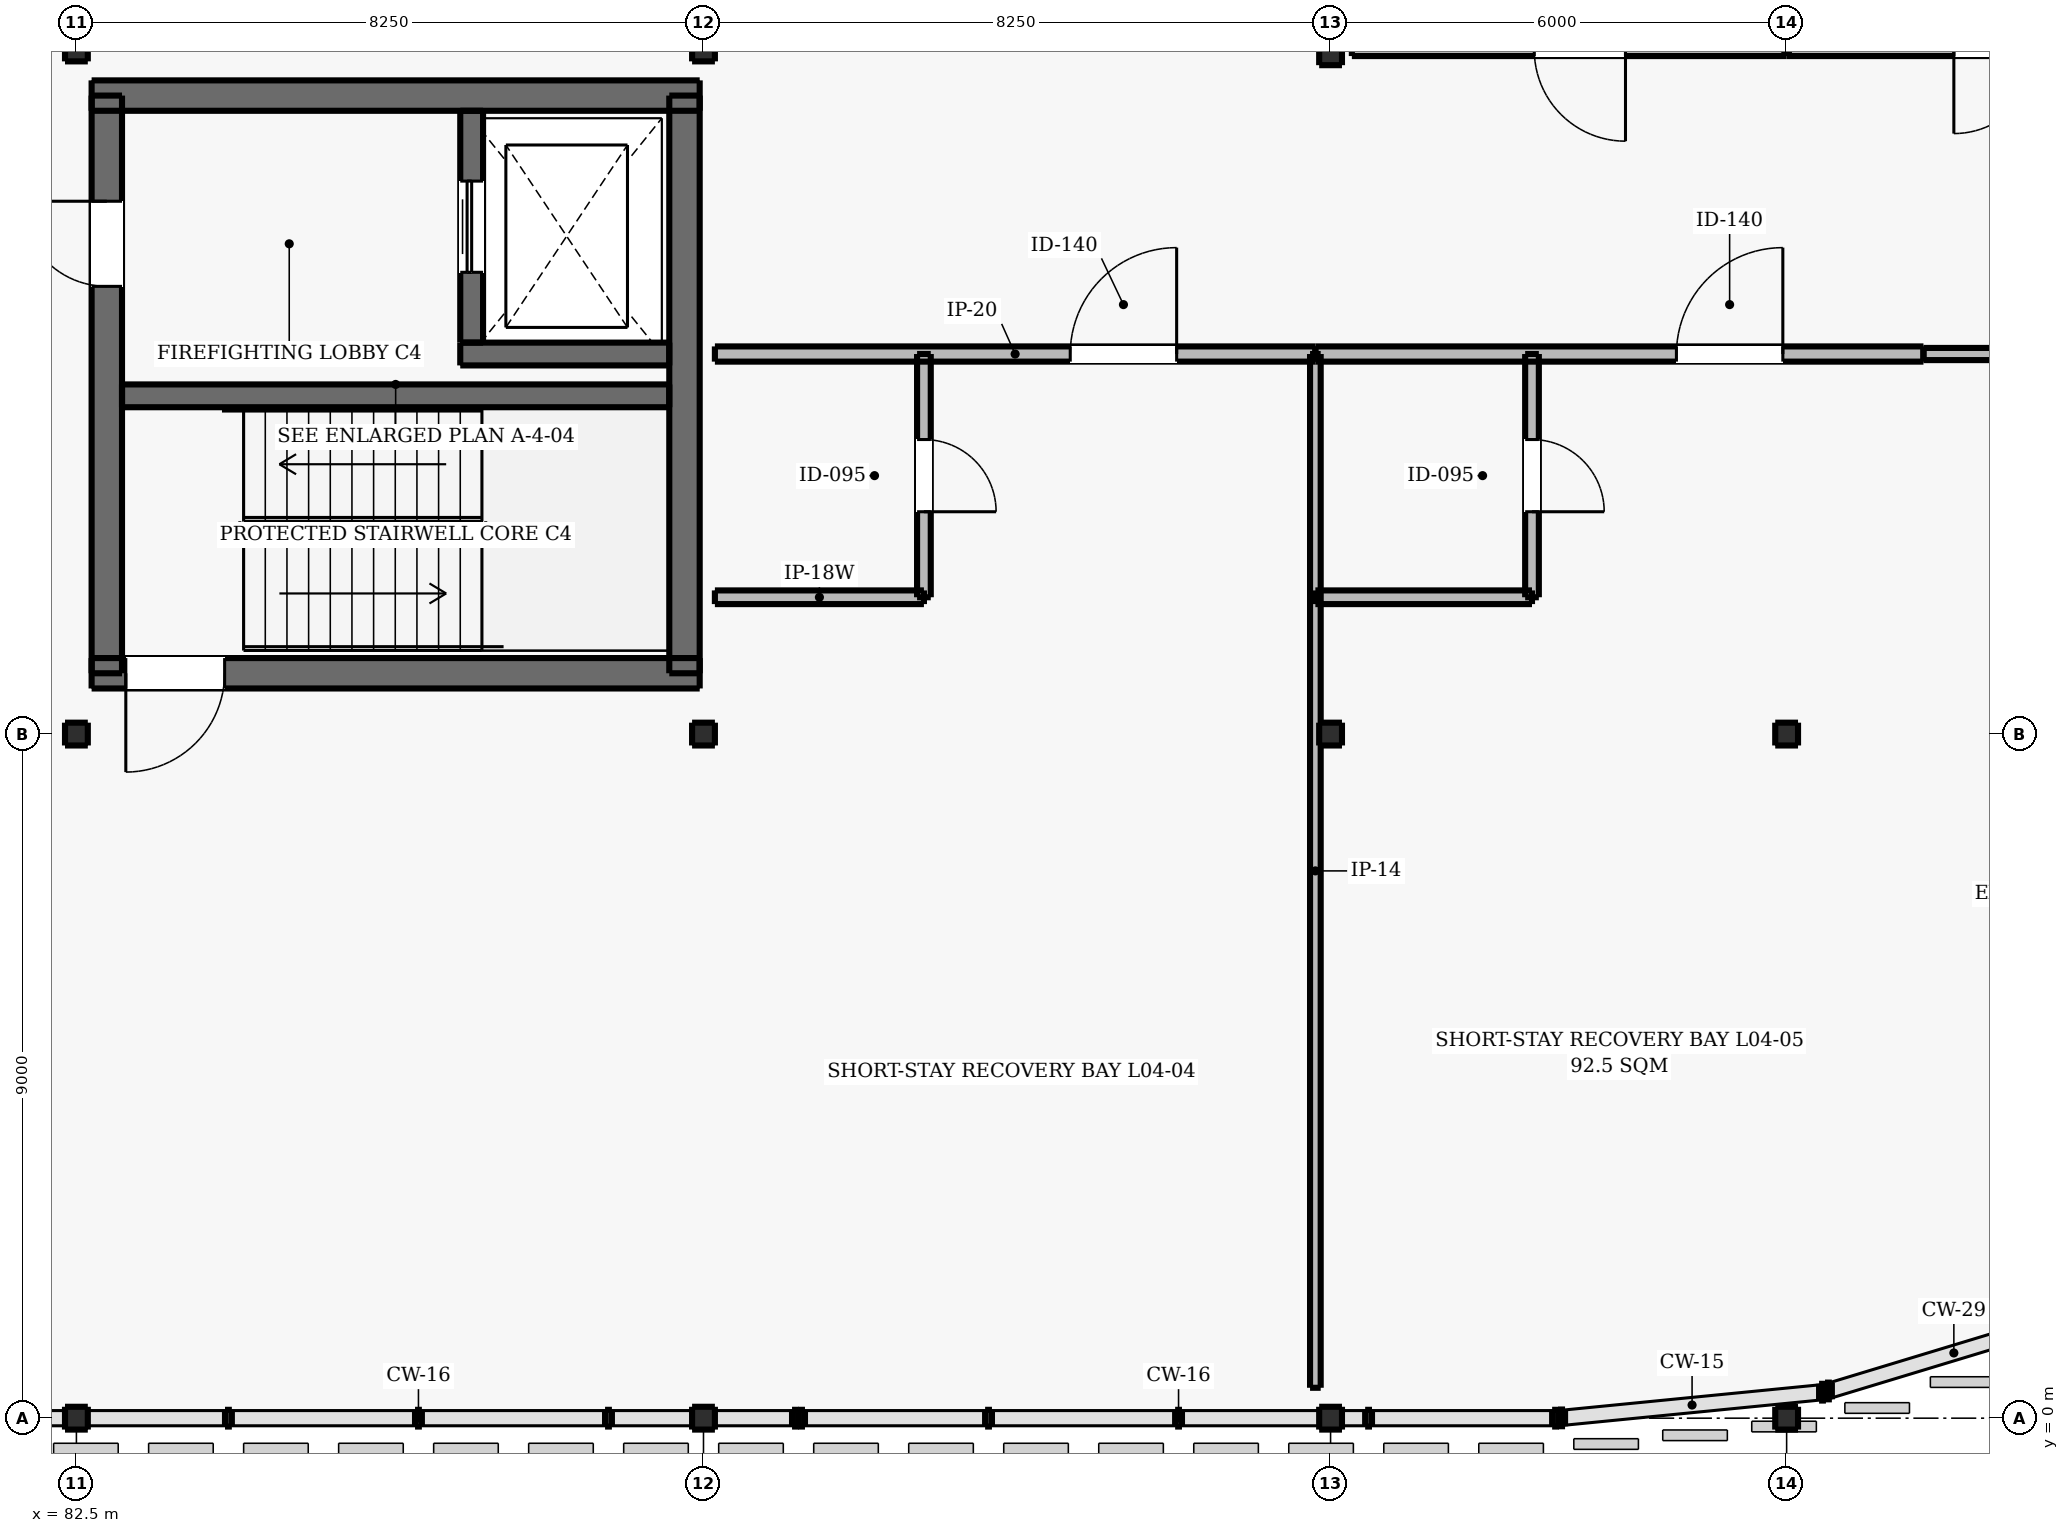
"""IFC4 building model, lengths in metres.
Left out: names, types, materials, properties, quantities, classifications, styles, units other than length and angle.
Written with IfcOpenShell. Run it as: python <this file> out.ifc"""

import sys

from ifc_helpers import new_model, si_unit, direction, frame, frame_2d, origin, origin_2d, place, context, subcontext, project, spatial, rectangle, i_section, extrude, element, fill, save


model = new_model("IFC4")
c1 = context("Model", 3, precision=1e-05, world=origin(), true_north=direction((0.0, 1.0)))
c2 = subcontext(c1, "Body", "Model", "MODEL_VIEW")
j1 = project(units=[si_unit("LENGTHUNIT", "METRE"), si_unit("PLANEANGLEUNIT", "RADIAN")], contexts=[c1])
p1 = place(None, origin())
s1 = spatial("IfcSite", under=j1, at=p1, CompositionType="ELEMENT")
p2 = place(p1, origin())
s2 = spatial("IfcBuilding", under=s1, at=p2, CompositionType="ELEMENT")
p3 = place(p2, frame((0.0, 0.0, 18.0)))
s3 = spatial("IfcBuildingStorey", under=s2, at=p3, CompositionType="ELEMENT", Elevation=18.0)
for number, where, z_axis, x_axis in (
    (1, (82.5, 0.0, 0.0), (0.0, 0.0, 1.0), (1.0, 0.0, 0.0)),
    (2, (82.5, 9.0, 0.0), (0.0, 0.0, 1.0), (1.0, 0.0, 0.0)),
    (3, (82.5, 18.0, 0.0), (0.0, 0.0, 1.0), (1.0, 0.0, 0.0)),
    (4, (90.75, 0.0, 0.0), (0.0, 0.0, 1.0), (1.0, 0.0, 0.0)),
    (5, (90.75, 9.0, 0.0), (0.0, 0.0, 1.0), (1.0, 0.0, 0.0)),
    (6, (90.75, 18.0, 0.0), (0.0, 0.0, 1.0), (1.0, 0.0, 0.0)),
    (7, (99.0, 0.0, 0.0), (0.0, 0.0, 1.0), (1.0, 0.0, 0.0)),
    (8, (99.0, 9.0, 0.0), (0.0, 0.0, 1.0), (1.0, 0.0, 0.0)),
):
    element("IfcColumn", number, at=place(p3, frame(where, z_axis=z_axis, x_axis=x_axis)), inside=s3, PredefinedType="COLUMN", context=c2, shape_type="SweptSolid", body=[
        extrude(i_section(OverallWidth=0.3, OverallDepth=0.3, WebThickness=0.011, FlangeThickness=0.019, FilletRadius=0.027, at=origin_2d()), origin(), (0.0, 0.0, 1.0), 4.2),
    ])
p4 = place(p3, frame((99.0, 18.0, 0.0), z_axis=(0.0, 0.0, 1.0), x_axis=(1.0, 0.0, 0.0)))
e9 = element("IfcColumn", 9, at=p4, inside=s3, PredefinedType="COLUMN", context=c2, shape_type="SweptSolid", body=[
    extrude(i_section(OverallWidth=0.3, OverallDepth=0.4, WebThickness=0.013, FlangeThickness=0.024, FilletRadius=0.027, at=origin_2d()), origin(), (0.0, 0.0, 1.0), 4.2),
])
for number, where, z_axis, x_axis in (
    (10, (105.0, 0.0, 0.0), (0.0, 0.0, 1.0), (1.0, 0.0, 0.0)),
    (11, (105.0, 9.0, 0.0), (0.0, 0.0, 1.0), (1.0, 0.0, 0.0)),
):
    element("IfcColumn", number, at=place(p3, frame(where, z_axis=z_axis, x_axis=x_axis)), inside=s3, PredefinedType="COLUMN", context=c2, shape_type="SweptSolid", body=[
        extrude(i_section(OverallWidth=0.3, OverallDepth=0.3, WebThickness=0.011, FlangeThickness=0.019, FilletRadius=0.027, at=origin_2d()), origin(), (0.0, 0.0, 1.0), 4.2),
    ])
p5 = place(p3, frame((82.7, 9.8, 0.0), z_axis=(0.0, 0.0, 1.0), x_axis=(1.0, 0.0, 0.0)))
e12 = element("IfcWall", 12, at=p5, inside=s3, PredefinedType="SHEAR", context=c2, shape_type="SweptSolid", body=[
    extrude(rectangle(XDim=8.0, YDim=0.4, at=frame_2d((4.0, 0.0))), origin(), (0.0, 0.0, 1.0), 4.2),
])
p6 = place(p5, frame((0.45, 0.0, 0.0)))
e13 = element("IfcOpeningElement", 13, at=p6, cuts=e12, PredefinedType="OPENING", context=c2, shape_type="SweptSolid", body=[
    extrude(rectangle(XDim=1.3, YDim=2.15, at=frame_2d((0.65, 1.075))), frame((0.0, 0.21, 0.0), z_axis=(0.0, -1.0, 0.0), x_axis=(1.0, 0.0, 0.0)), (0.0, 0.0, 1.0), 0.42),
])
p7 = place(p3, frame((82.7, 17.4, 0.0), z_axis=(0.0, 0.0, 1.0), x_axis=(1.0, 0.0, 0.0)))
e14 = element("IfcWall", 14, at=p7, inside=s3, PredefinedType="SHEAR", context=c2, shape_type="SweptSolid", body=[
    extrude(rectangle(XDim=8.0, YDim=0.4, at=frame_2d((4.0, 0.0))), origin(), (0.0, 0.0, 1.0), 4.2),
])
p8 = place(p3, frame((82.9, 9.8, 0.0), z_axis=(0.0, 0.0, 1.0), x_axis=(0.0, 1.0, 0.0)))
e15 = element("IfcWall", 15, at=p8, inside=s3, PredefinedType="SHEAR", context=c2, shape_type="SweptSolid", body=[
    extrude(rectangle(XDim=7.6, YDim=0.4, at=frame_2d((3.8, 0.0))), origin(), (0.0, 0.0, 1.0), 4.2),
])
p9 = place(p8, frame((5.09, 0.0, 0.0)))
e16 = element("IfcOpeningElement", 16, at=p9, cuts=e15, PredefinedType="OPENING", context=c2, shape_type="SweptSolid", body=[
    extrude(rectangle(XDim=1.12, YDim=2.15, at=frame_2d((0.56, 1.075))), frame((0.0, 0.21, 0.0), z_axis=(0.0, -1.0, 0.0), x_axis=(1.0, 0.0, 0.0)), (0.0, 0.0, 1.0), 0.42),
])
p10 = place(p3, frame((90.5, 9.8, 0.0), z_axis=(0.0, 0.0, 1.0), x_axis=(0.0, 1.0, 0.0)))
e17 = element("IfcWall", 17, at=p10, inside=s3, PredefinedType="SHEAR", context=c2, shape_type="SweptSolid", body=[
    extrude(rectangle(XDim=7.6, YDim=0.4, at=frame_2d((3.8, 0.0))), origin(), (0.0, 0.0, 1.0), 4.2),
])
p11 = place(p3, frame((83.1, 13.45, 0.0), z_axis=(0.0, 0.0, 1.0), x_axis=(1.0, 0.0, 0.0)))
e18 = element("IfcWall", 18, at=p11, inside=s3, PredefinedType="SHEAR", context=c2, shape_type="SweptSolid", body=[
    extrude(rectangle(XDim=7.2, YDim=0.3, at=frame_2d((3.6, 0.0))), origin(), (0.0, 0.0, 1.0), 4.2),
])
p12 = place(p3, frame((87.55, 14.0, 0.0), z_axis=(0.0, 0.0, 1.0), x_axis=(1.0, 0.0, 0.0)))
e19 = element("IfcWall", 19, at=p12, inside=s3, PredefinedType="SHEAR", context=c2, shape_type="SweptSolid", body=[
    extrude(rectangle(XDim=2.75, YDim=0.3, at=frame_2d((1.375, 0.0))), origin(), (0.0, 0.0, 1.0), 4.2),
])
p13 = place(p3, frame((87.7, 14.15, 0.0), z_axis=(0.0, 0.0, 1.0), x_axis=(0.0, 1.0, 0.0)))
e20 = element("IfcWall", 20, at=p13, inside=s3, PredefinedType="SHEAR", context=c2, shape_type="SweptSolid", body=[
    extrude(rectangle(XDim=3.05, YDim=0.3, at=frame_2d((1.525, 0.0))), origin(), (0.0, 0.0, 1.0), 4.2),
])
p14 = place(p13, frame((0.925, 0.0, 0.0)))
e21 = element("IfcOpeningElement", 21, at=p14, cuts=e20, PredefinedType="OPENING", context=c2, shape_type="SweptSolid", body=[
    extrude(rectangle(XDim=1.2, YDim=2.15, at=frame_2d((0.6, 1.075))), frame((0.0, 0.16, 0.0), z_axis=(0.0, -1.0, 0.0), x_axis=(1.0, 0.0, 0.0)), (0.0, 0.0, 1.0), 0.32),
])
p15 = place(p3, frame((90.9, 14.0, 0.0), z_axis=(0.0, 0.0, 1.0), x_axis=(1.0, 0.0, 0.0)))
e22 = element("IfcWall", 22, at=p15, inside=s3, PredefinedType="PARTITIONING", context=c2, shape_type="SweptSolid", body=[
    extrude(rectangle(XDim=7.9, YDim=0.2, at=frame_2d((3.95, 0.0))), origin(), (0.0, 0.0, 1.0), 3.92),
])
p16 = place(p15, frame((4.675, 0.0, 0.0)))
e23 = element("IfcOpeningElement", 23, at=p16, cuts=e22, PredefinedType="OPENING", context=c2, shape_type="SweptSolid", body=[
    extrude(rectangle(XDim=1.4, YDim=2.2, at=frame_2d((0.7, 1.1))), frame((0.0, 0.11, 0.0), z_axis=(0.0, -1.0, 0.0), x_axis=(1.0, 0.0, 0.0)), (0.0, 0.0, 1.0), 0.22),
])
p17 = place(p3, frame((93.65, 10.8, 0.0), z_axis=(0.0, 0.0, 1.0), x_axis=(0.0, 1.0, 0.0)))
e24 = element("IfcWall", 24, at=p17, inside=s3, PredefinedType="PARTITIONING", context=c2, shape_type="SweptSolid", body=[
    extrude(rectangle(XDim=3.2, YDim=0.18, at=frame_2d((1.6, 0.0))), origin(), (0.0, 0.0, 1.0), 3.62),
])
p18 = place(p17, frame((1.125, 0.0, 0.0)))
e25 = element("IfcOpeningElement", 25, at=p18, cuts=e24, PredefinedType="OPENING", context=c2, shape_type="SweptSolid", body=[
    extrude(rectangle(XDim=0.95, YDim=2.1, at=frame_2d((0.475, 1.05))), frame((0.0, 0.1, 0.0), z_axis=(0.0, -1.0, 0.0), x_axis=(1.0, 0.0, 0.0)), (0.0, 0.0, 1.0), 0.2),
])
p19 = place(p3, frame((90.9, 10.8, 0.0), z_axis=(0.0, 0.0, 1.0), x_axis=(1.0, 0.0, 0.0)))
e26 = element("IfcWall", 26, at=p19, inside=s3, PredefinedType="PARTITIONING", context=c2, shape_type="SweptSolid", body=[
    extrude(rectangle(XDim=2.75, YDim=0.18, at=frame_2d((1.375, 0.0))), origin(), (0.0, 0.0, 1.0), 3.92),
])
p20 = place(p3, frame((98.8, 0.4, 0.0), z_axis=(0.0, 0.0, 1.0), x_axis=(0.0, 1.0, 0.0)))
e27 = element("IfcWall", 27, at=p20, inside=s3, PredefinedType="PARTITIONING", context=c2, shape_type="SweptSolid", body=[
    extrude(rectangle(XDim=13.6, YDim=0.14, at=frame_2d((6.8, 0.0))), origin(), (0.0, 0.0, 1.0), 3.49),
])
p21 = place(p3, frame((98.8, 14.0, 0.0), z_axis=(0.0, 0.0, 1.0), x_axis=(1.0, 0.0, 0.0)))
e28 = element("IfcWall", 28, at=p21, inside=s3, PredefinedType="PARTITIONING", context=c2, shape_type="SweptSolid", body=[
    extrude(rectangle(XDim=8.0, YDim=0.2, at=frame_2d((4.0, 0.0))), origin(), (0.0, 0.0, 1.0), 3.92),
])
p22 = place(p21, frame((4.75, 0.0, 0.0)))
e29 = element("IfcOpeningElement", 29, at=p22, cuts=e28, PredefinedType="OPENING", context=c2, shape_type="SweptSolid", body=[
    extrude(rectangle(XDim=1.4, YDim=2.2, at=frame_2d((0.7, 1.1))), frame((0.0, 0.11, 0.0), z_axis=(0.0, -1.0, 0.0), x_axis=(1.0, 0.0, 0.0)), (0.0, 0.0, 1.0), 0.22),
])
p23 = place(p3, frame((101.65, 10.8, 0.0), z_axis=(0.0, 0.0, 1.0), x_axis=(0.0, 1.0, 0.0)))
e30 = element("IfcWall", 30, at=p23, inside=s3, PredefinedType="PARTITIONING", context=c2, shape_type="SweptSolid", body=[
    extrude(rectangle(XDim=3.2, YDim=0.18, at=frame_2d((1.6, 0.0))), origin(), (0.0, 0.0, 1.0), 3.92),
])
p24 = place(p23, frame((1.125, 0.0, 0.0)))
e31 = element("IfcOpeningElement", 31, at=p24, cuts=e30, PredefinedType="OPENING", context=c2, shape_type="SweptSolid", body=[
    extrude(rectangle(XDim=0.95, YDim=2.1, at=frame_2d((0.475, 1.05))), frame((0.0, 0.1, 0.0), z_axis=(0.0, -1.0, 0.0), x_axis=(1.0, 0.0, 0.0)), (0.0, 0.0, 1.0), 0.2),
])
p25 = place(p3, frame((98.8, 10.8, 0.0), z_axis=(0.0, 0.0, 1.0), x_axis=(1.0, 0.0, 0.0)))
e32 = element("IfcWall", 32, at=p25, inside=s3, PredefinedType="PARTITIONING", context=c2, shape_type="SweptSolid", body=[
    extrude(rectangle(XDim=2.85, YDim=0.18, at=frame_2d((1.425, 0.0))), origin(), (0.0, 0.0, 1.0), 3.92),
])
p26 = place(p3, frame((99.28, 18.0, 0.0), z_axis=(0.0, 0.0, 1.0), x_axis=(1.0, 0.0, 0.0)))
e33 = element("IfcWall", 33, at=p26, inside=s3, PredefinedType="PARTITIONING", context=c2, shape_type="SweptSolid", body=[
    extrude(rectangle(XDim=5.72, YDim=0.16, at=frame_2d((2.86, 0.0))), origin(), (0.0, 0.0, 1.0), 3.44),
])
p27 = place(p26, frame((2.4, 0.0, 0.0)))
e34 = element("IfcOpeningElement", 34, at=p27, cuts=e33, PredefinedType="OPENING", context=c2, shape_type="SweptSolid", body=[
    extrude(rectangle(XDim=1.2, YDim=2.2, at=frame_2d((0.6, 1.1))), frame((0.0, 0.09, 0.0), z_axis=(0.0, -1.0, 0.0), x_axis=(1.0, 0.0, 0.0)), (0.0, 0.0, 1.0), 0.18),
])
p28 = place(p3, frame((105.0, 18.0, 0.0), z_axis=(0.0, 0.0, 1.0), x_axis=(1.0, 0.0, 0.0)))
e35 = element("IfcWall", 35, at=p28, inside=s3, PredefinedType="PARTITIONING", context=c2, shape_type="SweptSolid", body=[
    extrude(rectangle(XDim=5.5, YDim=0.16, at=frame_2d((2.75, 0.0))), origin(), (0.0, 0.0, 1.0), 3.44),
])
p29 = place(p28, frame((2.2, 0.0, 0.0)))
e36 = element("IfcOpeningElement", 36, at=p29, cuts=e35, PredefinedType="OPENING", context=c2, shape_type="SweptSolid", body=[
    extrude(rectangle(XDim=1.1, YDim=2.15, at=frame_2d((0.55, 1.075))), frame((0.0, 0.09, 0.0), z_axis=(0.0, -1.0, 0.0), x_axis=(1.0, 0.0, 0.0)), (0.0, 0.0, 1.0), 0.18),
])
p30 = place(p3, frame((106.8, 14.0, 0.0), z_axis=(0.0, 0.0, 1.0), x_axis=(1.0, 0.0, 0.0)))
e37 = element("IfcWall", 37, at=p30, inside=s3, PredefinedType="PARTITIONING", context=c2, shape_type="SweptSolid", body=[
    extrude(rectangle(XDim=10.7, YDim=0.16, at=frame_2d((5.35, 0.0))), origin(), (0.0, 0.0, 1.0), 3.92),
])
p31 = place(p30, frame((4.65, 0.0, 0.0)))
e38 = element("IfcOpeningElement", 38, at=p31, cuts=e37, PredefinedType="OPENING", context=c2, shape_type="SweptSolid", body=[
    extrude(rectangle(XDim=1.4, YDim=2.2, at=frame_2d((0.7, 1.1))), frame((0.0, 0.09, 0.0), z_axis=(0.0, -1.0, 0.0), x_axis=(1.0, 0.0, 0.0)), (0.0, 0.0, 1.0), 0.18),
])
p32 = place(p14, origin())
e39 = element("IfcDoor", 39, at=p32, inside=s3, OperationType="DOUBLE_DOOR_SLIDING", PredefinedType="DOOR", context=c2, shape_type="SweptSolid", body=[
    extrude(rectangle(XDim=1.2, YDim=2.15, at=frame_2d((0.6, 1.075))), frame((0.0, 0.025, 0.0), z_axis=(0.0, -1.0, 0.0), x_axis=(1.0, 0.0, 0.0)), (0.0, 0.0, 1.0), 0.05),
])
fill(e21, e39)
p33 = place(p9, origin())
e40 = element("IfcDoor", 40, at=p33, inside=s3, OperationType="SINGLE_SWING_RIGHT", PredefinedType="DOOR", context=c2, shape_type="SweptSolid", body=[
    extrude(rectangle(XDim=1.12, YDim=2.15, at=frame_2d((0.56, 1.075))), frame((0.0, 0.025, 0.0), z_axis=(0.0, -1.0, 0.0), x_axis=(1.0, 0.0, 0.0)), (0.0, 0.0, 1.0), 0.05),
])
fill(e16, e40)
p34 = place(p6, frame((1.3, 0.0, 0.0), z_axis=(0.0, 0.0, 1.0), x_axis=(-1.0, 0.0, 0.0)))
e41 = element("IfcDoor", 41, at=p34, inside=s3, OperationType="SINGLE_SWING_LEFT", PredefinedType="DOOR", context=c2, shape_type="SweptSolid", body=[
    extrude(rectangle(XDim=1.3, YDim=2.15, at=frame_2d((0.65, 1.075))), frame((0.0, 0.025, 0.0), z_axis=(0.0, -1.0, 0.0), x_axis=(1.0, 0.0, 0.0)), (0.0, 0.0, 1.0), 0.05),
])
fill(e13, e41)
p35 = place(p16, origin())
e42 = element("IfcDoor", 42, at=p35, inside=s3, OperationType="SINGLE_SWING_RIGHT", PredefinedType="DOOR", context=c2, shape_type="SweptSolid", body=[
    extrude(rectangle(XDim=1.4, YDim=2.2, at=frame_2d((0.7, 1.1))), frame((0.0, 0.025, 0.0), z_axis=(0.0, -1.0, 0.0), x_axis=(1.0, 0.0, 0.0)), (0.0, 0.0, 1.0), 0.05),
])
fill(e23, e42)
p36 = place(p18, frame((0.95, 0.0, 0.0), z_axis=(0.0, 0.0, 1.0), x_axis=(-1.0, 0.0, 0.0)))
e43 = element("IfcDoor", 43, at=p36, inside=s3, OperationType="SINGLE_SWING_LEFT", PredefinedType="DOOR", context=c2, shape_type="SweptSolid", body=[
    extrude(rectangle(XDim=0.95, YDim=2.1, at=frame_2d((0.475, 1.05))), frame((0.0, 0.025, 0.0), z_axis=(0.0, -1.0, 0.0), x_axis=(1.0, 0.0, 0.0)), (0.0, 0.0, 1.0), 0.05),
])
fill(e25, e43)
p37 = place(p22, origin())
e44 = element("IfcDoor", 44, at=p37, inside=s3, OperationType="SINGLE_SWING_RIGHT", PredefinedType="DOOR", context=c2, shape_type="SweptSolid", body=[
    extrude(rectangle(XDim=1.4, YDim=2.2, at=frame_2d((0.7, 1.1))), frame((0.0, 0.025, 0.0), z_axis=(0.0, -1.0, 0.0), x_axis=(1.0, 0.0, 0.0)), (0.0, 0.0, 1.0), 0.05),
])
fill(e29, e44)
p38 = place(p24, frame((0.95, 0.0, 0.0), z_axis=(0.0, 0.0, 1.0), x_axis=(-1.0, 0.0, 0.0)))
e45 = element("IfcDoor", 45, at=p38, inside=s3, OperationType="SINGLE_SWING_LEFT", PredefinedType="DOOR", context=c2, shape_type="SweptSolid", body=[
    extrude(rectangle(XDim=0.95, YDim=2.1, at=frame_2d((0.475, 1.05))), frame((0.0, 0.025, 0.0), z_axis=(0.0, -1.0, 0.0), x_axis=(1.0, 0.0, 0.0)), (0.0, 0.0, 1.0), 0.05),
])
fill(e31, e45)
save(model, sys.argv[1])
